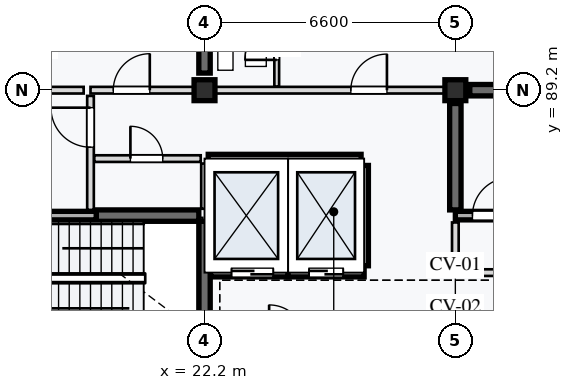
"""IFC4 building model, lengths in metres.
Left out: names, types, materials, properties, quantities, classifications, styles, units other than length and angle.
Written with IfcOpenShell. Run it as: python <this file> out.ifc"""

import sys

from ifc_helpers import new_model, si_unit, direction, frame, frame_2d, origin, origin_2d, place, context, subcontext, project, spatial, rectangle, extrude, element, fill, save


model = new_model("IFC4")
c1 = context("Model", 3, precision=1e-05, world=origin(), true_north=direction((0.0, 1.0)))
c2 = subcontext(c1, "Body", "Model", "MODEL_VIEW")
j1 = project(units=[si_unit("LENGTHUNIT", "METRE"), si_unit("PLANEANGLEUNIT", "RADIAN")], contexts=[c1])
p1 = place(None, origin())
s1 = spatial("IfcSite", under=j1, at=p1, CompositionType="ELEMENT")
p2 = place(p1, origin())
s2 = spatial("IfcBuilding", under=s1, at=p2, CompositionType="ELEMENT")
p3 = place(p2, frame((0.0, 0.0, 27.6)))
s3 = spatial("IfcBuildingStorey", under=s2, at=p3, CompositionType="ELEMENT", Elevation=27.6)
for number, where, z_axis, x_axis in (
    (1, (22.2, 89.2, 0.0), (0.0, 0.0, 1.0), (1.0, 0.0, 0.0)),
    (2, (28.8, 89.2, 0.0), (0.0, 0.0, 1.0), (1.0, 0.0, 0.0)),
):
    element("IfcColumn", number, at=place(p3, frame(where, z_axis=z_axis, x_axis=x_axis)), inside=s3, PredefinedType="COLUMN", context=c2, shape_type="SweptSolid", body=[
        extrude(rectangle(XDim=0.55, YDim=0.55, at=origin_2d()), origin(), (0.0, 0.0, 1.0), 3.2),
    ])
p4 = place(p3, frame((19.35, 85.9, 0.0), z_axis=(0.0, 0.0, 1.0), x_axis=(1.0, 0.0, 0.0)))
e3 = element("IfcWall", 3, at=p4, inside=s3, PredefinedType="SHEAR", context=c2, shape_type="SweptSolid", body=[
    extrude(rectangle(XDim=2.7, YDim=0.3, at=frame_2d((1.35, 0.0))), origin(), (0.0, 0.0, 1.0), 2.97),
])
p5 = place(p3, frame((22.2, 82.95, 0.0), z_axis=(0.0, 0.0, 1.0), x_axis=(0.0, 1.0, 0.0)))
e4 = element("IfcWall", 4, at=p5, inside=s3, PredefinedType="SHEAR", context=c2, shape_type="SweptSolid", body=[
    extrude(rectangle(XDim=2.8, YDim=0.3, at=frame_2d((1.4, 0.0))), origin(), (0.0, 0.0, 1.0), 2.97),
])
p6 = place(p3, frame((29.18, 89.2, 0.0), z_axis=(0.0, 0.0, 1.0), x_axis=(1.0, 0.0, 0.0)))
e5 = element("IfcWall", 5, at=p6, inside=s3, PredefinedType="SHEAR", context=c2, shape_type="SweptSolid", body=[
    extrude(rectangle(XDim=5.84, YDim=0.3, at=frame_2d((2.92, 0.0))), origin(), (0.0, 0.0, 1.0), 2.97),
])
p7 = place(p3, frame((28.8, 86.05, 0.0), z_axis=(0.0, 0.0, 1.0), x_axis=(0.0, 1.0, 0.0)))
e6 = element("IfcWall", 6, at=p7, inside=s3, PredefinedType="SHEAR", context=c2, shape_type="SweptSolid", body=[
    extrude(rectangle(XDim=2.8, YDim=0.3, at=frame_2d((1.4, 0.0))), origin(), (0.0, 0.0, 1.0), 2.97),
])
p8 = place(p3, frame((22.2, 89.65, 0.0), z_axis=(0.0, 0.0, 1.0), x_axis=(0.0, 1.0, 0.0)))
e7 = element("IfcWall", 7, at=p8, inside=s3, PredefinedType="SHEAR", context=c2, shape_type="SweptSolid", body=[
    extrude(rectangle(XDim=5.7, YDim=0.3, at=frame_2d((2.85, 0.0))), origin(), (0.0, 0.0, 1.0), 2.97),
])
p9 = place(p3, frame((15.75, 85.9, 0.0), z_axis=(0.0, 0.0, 1.0), x_axis=(1.0, 0.0, 0.0)))
e8 = element("IfcWall", 8, at=p9, inside=s3, PredefinedType="STANDARD", context=c2, shape_type="SweptSolid", body=[
    extrude(rectangle(XDim=3.6, YDim=0.225, at=frame_2d((1.8, 0.0))), origin(), (0.0, 0.0, 1.0), 2.97),
])
p10 = place(p9, frame((0.45, 0.0, 0.0)))
e9 = element("IfcOpeningElement", 9, at=p10, cuts=e8, PredefinedType="OPENING", context=c2, shape_type="SweptSolid", body=[
    extrude(rectangle(XDim=1.0, YDim=2.16, at=frame_2d((0.5, 1.08))), frame((0.0, 0.123, 0.0), z_axis=(0.0, -1.0, 0.0), x_axis=(1.0, 0.0, 0.0)), (0.0, 0.0, 1.0), 0.245),
])
p11 = place(p3, frame((19.2, 86.05, 0.0), z_axis=(0.0, 0.0, 1.0), x_axis=(0.0, 1.0, 0.0)))
e10 = element("IfcWall", 10, at=p11, inside=s3, PredefinedType="PARTITIONING", context=c2, shape_type="SweptSolid", body=[
    extrude(rectangle(XDim=3.0, YDim=0.175, at=frame_2d((1.5, 0.0))), origin(), (0.0, 0.0, 1.0), 2.97),
])
p12 = place(p11, frame((1.65, 0.0, 0.0)))
e11 = element("IfcOpeningElement", 11, at=p12, cuts=e10, PredefinedType="OPENING", context=c2, shape_type="SweptSolid", body=[
    extrude(rectangle(XDim=1.04, YDim=2.12, at=frame_2d((0.52, 1.06))), frame((0.0, 0.097, 0.0), z_axis=(0.0, -1.0, 0.0), x_axis=(1.0, 0.0, 0.0)), (0.0, 0.0, 1.0), 0.195),
])
p13 = place(p3, frame((19.3, 87.4, 0.0), z_axis=(0.0, 0.0, 1.0), x_axis=(1.0, 0.0, 0.0)))
e12 = element("IfcWall", 12, at=p13, inside=s3, PredefinedType="PARTITIONING", context=c2, shape_type="SweptSolid", body=[
    extrude(rectangle(XDim=2.8, YDim=0.175, at=frame_2d((1.4, 0.0))), origin(), (0.0, 0.0, 1.0), 2.97),
])
p14 = place(p13, frame((0.95, 0.0, 0.0)))
e13 = element("IfcOpeningElement", 13, at=p14, cuts=e12, PredefinedType="OPENING", context=c2, shape_type="SweptSolid", body=[
    extrude(rectangle(XDim=0.85, YDim=2.0, at=frame_2d((0.425, 1.0))), frame((0.0, 0.097, 0.0), z_axis=(0.0, -1.0, 0.0), x_axis=(1.0, 0.0, 0.0)), (0.0, 0.0, 1.0), 0.195),
])
p15 = place(p3, frame((22.2, 86.08, 0.0), z_axis=(0.0, 0.0, 1.0), x_axis=(0.0, 1.0, 0.0)))
e14 = element("IfcWall", 14, at=p15, inside=s3, PredefinedType="PARTITIONING", context=c2, shape_type="SweptSolid", body=[
    extrude(rectangle(XDim=1.19, YDim=0.175, at=frame_2d((0.595, 0.0))), origin(), (0.0, 0.0, 1.0), 2.97),
])
p16 = place(p3, frame((22.36, 84.4, 0.0), z_axis=(0.0, 0.0, 1.0), x_axis=(1.0, 0.0, 0.0)))
e15 = element("IfcWall", 15, at=p16, inside=s3, PredefinedType="STANDARD", context=c2, shape_type="SweptSolid", body=[
    extrude(rectangle(XDim=2.04, YDim=0.225, at=frame_2d((1.02, 0.0))), origin(), (0.0, 0.0, 1.0), 2.97),
])
p17 = place(p16, frame((0.55, 0.0, 0.0)))
e16 = element("IfcOpeningElement", 16, at=p17, cuts=e15, PredefinedType="OPENING", context=c2, shape_type="SweptSolid", body=[
    extrude(rectangle(XDim=1.1, YDim=2.1, at=frame_2d((0.55, 1.05))), frame((0.0, 0.123, 0.0), z_axis=(0.0, -1.0, 0.0), x_axis=(1.0, 0.0, 0.0)), (0.0, 0.0, 1.0), 0.245),
])
p18 = place(p3, frame((24.4, 84.4, 0.0), z_axis=(0.0, 0.0, 1.0), x_axis=(1.0, 0.0, 0.0)))
e17 = element("IfcWall", 17, at=p18, inside=s3, PredefinedType="STANDARD", context=c2, shape_type="SweptSolid", body=[
    extrude(rectangle(XDim=2.0, YDim=0.225, at=frame_2d((1.0, 0.0))), origin(), (0.0, 0.0, 1.0), 2.97),
])
p19 = place(p18, frame((0.55, 0.0, 0.0)))
e18 = element("IfcOpeningElement", 18, at=p19, cuts=e17, PredefinedType="OPENING", context=c2, shape_type="SweptSolid", body=[
    extrude(rectangle(XDim=0.9, YDim=2.1, at=frame_2d((0.45, 1.05))), frame((0.0, 0.123, 0.0), z_axis=(0.0, -1.0, 0.0), x_axis=(1.0, 0.0, 0.0)), (0.0, 0.0, 1.0), 0.245),
])
p20 = place(p3, frame((22.298, 87.4, 0.0), z_axis=(0.0, 0.0, 1.0), x_axis=(1.0, 0.0, 0.0)))
e19 = element("IfcWall", 19, at=p20, inside=s3, PredefinedType="STANDARD", context=c2, shape_type="SweptSolid", body=[
    extrude(rectangle(XDim=4.022, YDim=0.225, at=frame_2d((2.011, 0.0))), origin(), (0.0, 0.0, 1.0), 2.97),
])
for number, where, z_axis, x_axis in (
    (20, (24.4, 84.58, 0.0), (0.0, 0.0, 1.0), (0.0, 1.0, 0.0)),
    (21, (26.4, 84.58, 0.0), (0.0, 0.0, 1.0), (0.0, 1.0, 0.0)),
):
    element("IfcWall", number, at=place(p3, frame(where, z_axis=z_axis, x_axis=x_axis)), inside=s3, PredefinedType="STANDARD", context=c2, shape_type="SweptSolid", body=[
        extrude(rectangle(XDim=2.64, YDim=0.225, at=frame_2d((1.32, 0.0))), origin(), (0.0, 0.0, 1.0), 2.97),
    ])
p21 = place(p3, frame((28.8, 85.9, 0.0), z_axis=(0.0, 0.0, 1.0), x_axis=(1.0, 0.0, 0.0)))
e22 = element("IfcWall", 22, at=p21, inside=s3, PredefinedType="STANDARD", context=c2, shape_type="SweptSolid", body=[
    extrude(rectangle(XDim=3.45, YDim=0.225, at=frame_2d((1.725, 0.0))), origin(), (0.0, 0.0, 1.0), 2.97),
])
p22 = place(p21, frame((0.45, 0.0, 0.0)))
e23 = element("IfcOpeningElement", 23, at=p22, cuts=e22, PredefinedType="OPENING", context=c2, shape_type="SweptSolid", body=[
    extrude(rectangle(XDim=1.0, YDim=2.1, at=frame_2d((0.5, 1.05))), frame((0.0, 0.123, 0.0), z_axis=(0.0, -1.0, 0.0), x_axis=(1.0, 0.0, 0.0)), (0.0, 0.0, 1.0), 0.245),
])
p23 = place(p3, frame((28.8, 84.4, 0.0), z_axis=(0.0, 0.0, 1.0), x_axis=(1.0, 0.0, 0.0)))
e24 = element("IfcWall", 24, at=p23, inside=s3, PredefinedType="PARTITIONING", context=c2, shape_type="SweptSolid", body=[
    extrude(rectangle(XDim=3.3, YDim=0.175, at=frame_2d((1.65, 0.0))), origin(), (0.0, 0.0, 1.0), 2.97),
])
p24 = place(p23, frame((1.8, 0.0, 0.0)))
e25 = element("IfcOpeningElement", 25, at=p24, cuts=e24, PredefinedType="OPENING", context=c2, shape_type="SweptSolid", body=[
    extrude(rectangle(XDim=1.0, YDim=2.16, at=frame_2d((0.5, 1.08))), frame((0.0, 0.097, 0.0), z_axis=(0.0, -1.0, 0.0), x_axis=(1.0, 0.0, 0.0)), (0.0, 0.0, 1.0), 0.195),
])
p25 = place(p3, frame((28.8, 84.58, 0.0), z_axis=(0.0, 0.0, 1.0), x_axis=(0.0, 1.0, 0.0)))
e26 = element("IfcWall", 26, at=p25, inside=s3, PredefinedType="PARTITIONING", context=c2, shape_type="SweptSolid", body=[
    extrude(rectangle(XDim=1.14, YDim=0.175, at=frame_2d((0.57, 0.0))), origin(), (0.0, 0.0, 1.0), 2.97),
])
p26 = place(p3, frame((15.88, 89.2, 0.0), z_axis=(0.0, 0.0, 1.0), x_axis=(1.0, 0.0, 0.0)))
e27 = element("IfcWall", 27, at=p26, inside=s3, PredefinedType="PARTITIONING", context=c2, shape_type="SweptSolid", body=[
    extrude(rectangle(XDim=3.14, YDim=0.175, at=frame_2d((1.57, 0.0))), origin(), (0.0, 0.0, 1.0), 2.55),
])
p27 = place(p3, frame((19.2, 89.2, 0.0), z_axis=(0.0, 0.0, 1.0), x_axis=(1.0, 0.0, 0.0)))
e28 = element("IfcWall", 28, at=p27, inside=s3, PredefinedType="PARTITIONING", context=c2, shape_type="SweptSolid", body=[
    extrude(rectangle(XDim=3.0, YDim=0.175, at=frame_2d((1.5, 0.0))), origin(), (0.0, 0.0, 1.0), 2.55),
])
p28 = place(p27, frame((0.6, 0.0, 0.0)))
e29 = element("IfcOpeningElement", 29, at=p28, cuts=e28, PredefinedType="OPENING", context=c2, shape_type="SweptSolid", body=[
    extrude(rectangle(XDim=0.96, YDim=2.18, at=frame_2d((0.48, 1.09))), frame((0.0, 0.097, 0.0), z_axis=(0.0, -1.0, 0.0), x_axis=(1.0, 0.0, 0.0)), (0.0, 0.0, 1.0), 0.195),
])
p29 = place(p3, frame((22.2, 89.2, 0.0), z_axis=(0.0, 0.0, 1.0), x_axis=(1.0, 0.0, 0.0)))
e30 = element("IfcWall", 30, at=p29, inside=s3, PredefinedType="PARTITIONING", context=c2, shape_type="SweptSolid", body=[
    extrude(rectangle(XDim=6.6, YDim=0.175, at=frame_2d((3.3, 0.0))), origin(), (0.0, 0.0, 1.0), 2.55),
])
p30 = place(p29, frame((3.85, 0.0, 0.0)))
e31 = element("IfcOpeningElement", 31, at=p30, cuts=e30, PredefinedType="OPENING", context=c2, shape_type="SweptSolid", body=[
    extrude(rectangle(XDim=0.95, YDim=2.16, at=frame_2d((0.475, 1.08))), frame((0.0, 0.097, 0.0), z_axis=(0.0, -1.0, 0.0), x_axis=(1.0, 0.0, 0.0)), (0.0, 0.0, 1.0), 0.195),
])
p31 = place(p3, frame((24.1, 89.298, 0.0), z_axis=(0.0, 0.0, 1.0), x_axis=(0.0, 1.0, 0.0)))
e32 = element("IfcWall", 32, at=p31, inside=s3, PredefinedType="PARTITIONING", context=c2, shape_type="SweptSolid", body=[
    extrude(rectangle(XDim=2.302, YDim=0.125, at=frame_2d((1.151, 0.0))), origin(), (0.0, 0.0, 1.0), 2.97),
])
p32 = place(p31, frame((0.7, 0.0, 0.0)))
e33 = element("IfcOpeningElement", 33, at=p32, cuts=e32, PredefinedType="OPENING", context=c2, shape_type="SweptSolid", body=[
    extrude(rectangle(XDim=0.84, YDim=2.06, at=frame_2d((0.42, 1.03))), frame((0.0, 0.073, 0.0), z_axis=(0.0, -1.0, 0.0), x_axis=(1.0, 0.0, 0.0)), (0.0, 0.0, 1.0), 0.145),
])
p33 = place(p12, origin())
e34 = element("IfcDoor", 34, at=p33, inside=s3, OperationType="SINGLE_SWING_RIGHT", PredefinedType="DOOR", context=c2, shape_type="SweptSolid", body=[
    extrude(rectangle(XDim=1.04, YDim=2.12, at=frame_2d((0.52, 1.06))), frame((0.0, 0.025, 0.0), z_axis=(0.0, -1.0, 0.0), x_axis=(1.0, 0.0, 0.0)), (0.0, 0.0, 1.0), 0.05),
])
fill(e11, e34)
p34 = place(p14, origin())
e35 = element("IfcDoor", 35, at=p34, inside=s3, OperationType="SINGLE_SWING_LEFT", PredefinedType="DOOR", context=c2, shape_type="SweptSolid", body=[
    extrude(rectangle(XDim=0.85, YDim=2.0, at=frame_2d((0.425, 1.0))), frame((0.0, 0.025, 0.0), z_axis=(0.0, -1.0, 0.0), x_axis=(1.0, 0.0, 0.0)), (0.0, 0.0, 1.0), 0.05),
])
fill(e13, e35)
p35 = place(p17, origin())
e36 = element("IfcDoor", 36, at=p35, inside=s3, OperationType="DOUBLE_DOOR_SLIDING", PredefinedType="DOOR", context=c2, shape_type="SweptSolid", body=[
    extrude(rectangle(XDim=1.1, YDim=2.1, at=frame_2d((0.55, 1.05))), frame((0.0, 0.025, 0.0), z_axis=(0.0, -1.0, 0.0), x_axis=(1.0, 0.0, 0.0)), (0.0, 0.0, 1.0), 0.05),
])
fill(e16, e36)
p36 = place(p19, origin())
e37 = element("IfcDoor", 37, at=p36, inside=s3, OperationType="DOUBLE_DOOR_SLIDING", PredefinedType="DOOR", context=c2, shape_type="SweptSolid", body=[
    extrude(rectangle(XDim=0.9, YDim=2.1, at=frame_2d((0.45, 1.05))), frame((0.0, 0.025, 0.0), z_axis=(0.0, -1.0, 0.0), x_axis=(1.0, 0.0, 0.0)), (0.0, 0.0, 1.0), 0.05),
])
fill(e18, e37)
p37 = place(p22, origin())
e38 = element("IfcDoor", 38, at=p37, inside=s3, OperationType="SINGLE_SWING_RIGHT", PredefinedType="DOOR", context=c2, shape_type="SweptSolid", body=[
    extrude(rectangle(XDim=1.0, YDim=2.1, at=frame_2d((0.5, 1.05))), frame((0.0, 0.025, 0.0), z_axis=(0.0, -1.0, 0.0), x_axis=(1.0, 0.0, 0.0)), (0.0, 0.0, 1.0), 0.05),
])
fill(e23, e38)
p38 = place(p28, origin())
e39 = element("IfcDoor", 39, at=p38, inside=s3, OperationType="SINGLE_SWING_RIGHT", PredefinedType="DOOR", context=c2, shape_type="SweptSolid", body=[
    extrude(rectangle(XDim=0.96, YDim=2.18, at=frame_2d((0.48, 1.09))), frame((0.0, 0.025, 0.0), z_axis=(0.0, -1.0, 0.0), x_axis=(1.0, 0.0, 0.0)), (0.0, 0.0, 1.0), 0.05),
])
fill(e29, e39)
p39 = place(p30, origin())
e40 = element("IfcDoor", 40, at=p39, inside=s3, OperationType="SINGLE_SWING_RIGHT", PredefinedType="DOOR", context=c2, shape_type="SweptSolid", body=[
    extrude(rectangle(XDim=0.95, YDim=2.16, at=frame_2d((0.475, 1.08))), frame((0.0, 0.025, 0.0), z_axis=(0.0, -1.0, 0.0), x_axis=(1.0, 0.0, 0.0)), (0.0, 0.0, 1.0), 0.05),
])
fill(e31, e40)
p40 = place(p32, origin())
e41 = element("IfcDoor", 41, at=p40, inside=s3, OperationType="SINGLE_SWING_LEFT", PredefinedType="DOOR", context=c2, shape_type="SweptSolid", body=[
    extrude(rectangle(XDim=0.84, YDim=2.06, at=frame_2d((0.42, 1.03))), frame((0.0, 0.025, 0.0), z_axis=(0.0, -1.0, 0.0), x_axis=(1.0, 0.0, 0.0)), (0.0, 0.0, 1.0), 0.05),
])
fill(e33, e41)
save(model, sys.argv[1])
